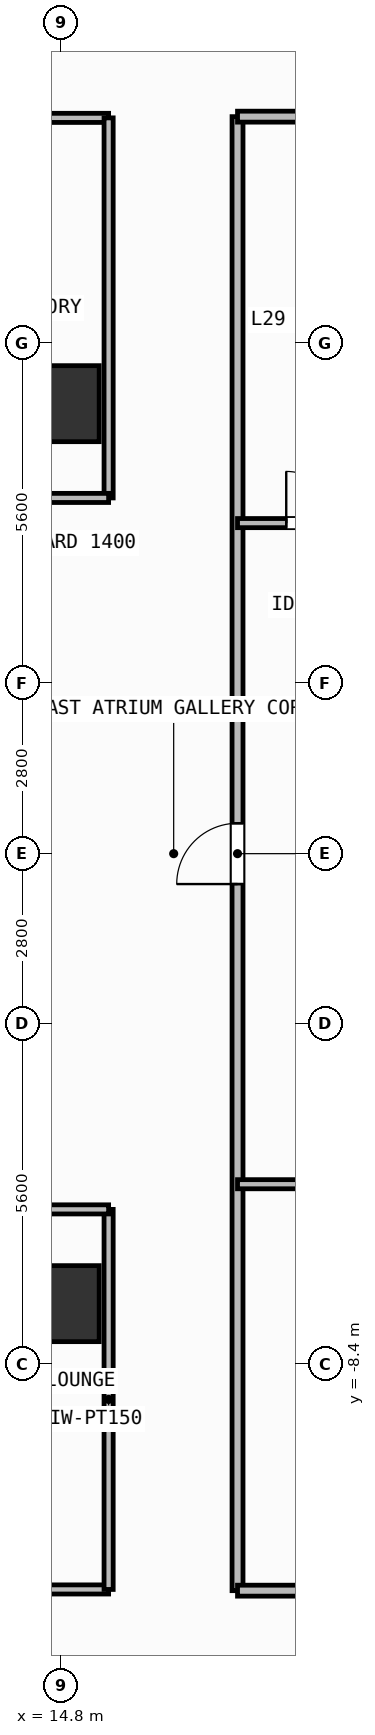
"""IFC4 building model, lengths in metres.
Left out: names, types, materials, properties, quantities, classifications, styles, units other than length and angle.
Written with IfcOpenShell. Run it as: python <this file> out.ifc"""

import sys

from ifc_helpers import new_model, si_unit, direction, frame, frame_2d, origin, origin_2d, place, context, subcontext, project, spatial, rectangle, extrude, element, fill, save


model = new_model("IFC4")
c1 = context("Model", 3, precision=1e-05, world=origin(), true_north=direction((0.0, 1.0)))
c2 = subcontext(c1, "Body", "Model", "MODEL_VIEW")
j1 = project(units=[si_unit("LENGTHUNIT", "METRE"), si_unit("PLANEANGLEUNIT", "RADIAN")], contexts=[c1])
p1 = place(None, origin())
s1 = spatial("IfcSite", under=j1, at=p1, CompositionType="ELEMENT")
p2 = place(p1, origin())
s2 = spatial("IfcBuilding", under=s1, at=p2, CompositionType="ELEMENT")
p3 = place(p2, frame((0.0, 0.0, 117.3)))
s3 = spatial("IfcBuildingStorey", under=s2, at=p3, CompositionType="ELEMENT", Elevation=117.3)
for number, where, z_axis, x_axis in (
    (1, (14.8, -7.4, 0.0), (0.0, 0.0, 1.0), (1.0, 0.0, 0.0)),
    (2, (14.8, 7.4, 0.0), (0.0, 0.0, 1.0), (1.0, 0.0, 0.0)),
):
    element("IfcColumn", number, at=place(p3, frame(where, z_axis=z_axis, x_axis=x_axis)), inside=s3, PredefinedType="COLUMN", context=c2, shape_type="SweptSolid", body=[
        extrude(rectangle(XDim=1.25, YDim=1.25, at=origin_2d()), origin(), (0.0, 0.0, 1.0), 3.9),
    ])
p4 = place(p3, frame((10.1, -12.1, 0.0), z_axis=(0.0, 0.0, 1.0), x_axis=(1.0, 0.0, 0.0)))
e3 = element("IfcWall", 3, at=p4, inside=s3, PredefinedType="PARTITIONING", context=c2, shape_type="SweptSolid", body=[
    extrude(rectangle(XDim=5.48, YDim=0.15, at=frame_2d((2.74, 0.0))), origin(), (0.0, 0.0, 1.0), 3.68),
])
p5 = place(p4, frame((2.29, 0.0, 0.0)))
e4 = element("IfcOpeningElement", 4, at=p5, cuts=e3, PredefinedType="OPENING", context=c2, shape_type="SweptSolid", body=[
    extrude(rectangle(XDim=0.9, YDim=2.1, at=frame_2d((0.45, 1.05))), frame((0.0, 0.085, 0.0), z_axis=(0.0, -1.0, 0.0), x_axis=(1.0, 0.0, 0.0)), (0.0, 0.0, 1.0), 0.17),
])
p6 = place(p3, frame((8.36, 12.1, 0.0), z_axis=(0.0, 0.0, 1.0), x_axis=(1.0, 0.0, 0.0)))
e5 = element("IfcWall", 5, at=p6, inside=s3, PredefinedType="PARTITIONING", context=c2, shape_type="SweptSolid", body=[
    extrude(rectangle(XDim=7.22, YDim=0.15, at=frame_2d((3.61, 0.0))), origin(), (0.0, 0.0, 1.0), 3.68),
])
p7 = place(p6, frame((3.513, 0.0, 0.0)))
e6 = element("IfcOpeningElement", 6, at=p7, cuts=e5, PredefinedType="OPENING", context=c2, shape_type="SweptSolid", body=[
    extrude(rectangle(XDim=0.9, YDim=2.1, at=frame_2d((0.45, 1.05))), frame((0.0, 0.085, 0.0), z_axis=(0.0, -1.0, 0.0), x_axis=(1.0, 0.0, 0.0)), (0.0, 0.0, 1.0), 0.17),
])
p8 = place(p3, frame((17.7, -12.12, 0.0), z_axis=(0.0, 0.0, 1.0), x_axis=(0.0, 1.0, 0.0)))
e7 = element("IfcWall", 7, at=p8, inside=s3, PredefinedType="PARTITIONING", context=c2, shape_type="SweptSolid", body=[
    extrude(rectangle(XDim=24.24, YDim=0.18, at=frame_2d((12.12, 0.0))), origin(), (0.0, 0.0, 1.0), 3.68),
])
p9 = place(p8, frame((11.62, 0.0, 0.0)))
e8 = element("IfcOpeningElement", 8, at=p9, cuts=e7, PredefinedType="OPENING", context=c2, shape_type="SweptSolid", body=[
    extrude(rectangle(XDim=1.0, YDim=2.2, at=frame_2d((0.5, 1.1))), frame((0.0, 0.1, 0.0), z_axis=(0.0, -1.0, 0.0), x_axis=(1.0, 0.0, 0.0)), (0.0, 0.0, 1.0), 0.2),
])
p10 = place(p3, frame((17.7, 5.436, 0.0), z_axis=(0.0, 0.0, 1.0), x_axis=(1.0, 0.0, 0.0)))
e9 = element("IfcWall", 9, at=p10, inside=s3, PredefinedType="PARTITIONING", context=c2, shape_type="SweptSolid", body=[
    extrude(rectangle(XDim=2.292, YDim=0.15, at=frame_2d((1.146, 0.0))), origin(), (0.0, 0.0, 1.0), 3.68),
])
p11 = place(p10, frame((0.801, 0.0, 0.0)))
e10 = element("IfcOpeningElement", 10, at=p11, cuts=e9, PredefinedType="OPENING", context=c2, shape_type="SweptSolid", body=[
    extrude(rectangle(XDim=0.85, YDim=2.1, at=frame_2d((0.425, 1.05))), frame((0.0, 0.085, 0.0), z_axis=(0.0, -1.0, 0.0), x_axis=(1.0, 0.0, 0.0)), (0.0, 0.0, 1.0), 0.17),
])
p12 = place(p3, frame((17.7, -5.436, 0.0), z_axis=(0.0, 0.0, 1.0), x_axis=(1.0, 0.0, 0.0)))
e11 = element("IfcWall", 11, at=p12, inside=s3, PredefinedType="PARTITIONING", context=c2, shape_type="SweptSolid", body=[
    extrude(rectangle(XDim=5.59, YDim=0.15, at=frame_2d((2.795, 0.0))), origin(), (0.0, 0.0, 1.0), 3.68),
])
p13 = place(p12, frame((2.458, 0.0, 0.0)))
e12 = element("IfcOpeningElement", 12, at=p13, cuts=e11, PredefinedType="OPENING", context=c2, shape_type="SweptSolid", body=[
    extrude(rectangle(XDim=0.85, YDim=2.1, at=frame_2d((0.425, 1.05))), frame((0.0, 0.085, 0.0), z_axis=(0.0, -1.0, 0.0), x_axis=(1.0, 0.0, 0.0)), (0.0, 0.0, 1.0), 0.17),
])
p14 = place(p3, frame((15.58, -12.1, 0.0), z_axis=(0.0, 0.0, 1.0), x_axis=(0.0, 1.0, 0.0)))
e13 = element("IfcWall", 13, at=p14, inside=s3, PredefinedType="PARTITIONING", context=c2, shape_type="SweptSolid", body=[
    extrude(rectangle(XDim=6.25, YDim=0.15, at=frame_2d((3.125, 0.0))), origin(), (0.0, 0.0, 1.0), 3.68),
])
p15 = place(p3, frame((8.96, -5.85, 0.0), z_axis=(0.0, 0.0, 1.0), x_axis=(1.0, 0.0, 0.0)))
e14 = element("IfcWall", 14, at=p15, inside=s3, PredefinedType="PARTITIONING", context=c2, shape_type="SweptSolid", body=[
    extrude(rectangle(XDim=6.62, YDim=0.15, at=frame_2d((3.31, 0.0))), origin(), (0.0, 0.0, 1.0), 3.68),
])
p16 = place(p3, frame((15.58, 5.85, 0.0), z_axis=(0.0, 0.0, 1.0), x_axis=(0.0, 1.0, 0.0)))
e15 = element("IfcWall", 15, at=p16, inside=s3, PredefinedType="PARTITIONING", context=c2, shape_type="SweptSolid", body=[
    extrude(rectangle(XDim=6.25, YDim=0.15, at=frame_2d((3.125, 0.0))), origin(), (0.0, 0.0, 1.0), 3.68),
])
p17 = place(p3, frame((8.96, 5.85, 0.0), z_axis=(0.0, 0.0, 1.0), x_axis=(1.0, 0.0, 0.0)))
e16 = element("IfcWall", 16, at=p17, inside=s3, PredefinedType="PARTITIONING", context=c2, shape_type="SweptSolid", body=[
    extrude(rectangle(XDim=6.62, YDim=0.15, at=frame_2d((3.31, 0.0))), origin(), (0.0, 0.0, 1.0), 3.68),
])
for number, where, z_axis, x_axis in (
    (17, (17.7, -12.12, 0.0), (0.0, 0.0, 1.0), (1.0, 0.0, 0.0)),
    (18, (17.7, 12.12, 0.0), (0.0, 0.0, 1.0), (1.0, 0.0, 0.0)),
):
    element("IfcWall", number, at=place(p3, frame(where, z_axis=z_axis, x_axis=x_axis)), inside=s3, PredefinedType="PARTITIONING", context=c2, shape_type="SweptSolid", body=[
        extrude(rectangle(XDim=9.83, YDim=0.18, at=frame_2d((4.915, 0.0))), origin(), (0.0, 0.0, 1.0), 3.68),
    ])
p18 = place(p9, origin())
e19 = element("IfcDoor", 19, at=p18, inside=s3, OperationType="SINGLE_SWING_LEFT", PredefinedType="DOOR", context=c2, shape_type="SweptSolid", body=[
    extrude(rectangle(XDim=1.0, YDim=2.2, at=frame_2d((0.5, 1.1))), frame((0.0, 0.025, 0.0), z_axis=(0.0, -1.0, 0.0), x_axis=(1.0, 0.0, 0.0)), (0.0, 0.0, 1.0), 0.05),
])
fill(e8, e19)
p19 = place(p11, origin())
e20 = element("IfcDoor", 20, at=p19, inside=s3, OperationType="SINGLE_SWING_LEFT", PredefinedType="DOOR", context=c2, shape_type="SweptSolid", body=[
    extrude(rectangle(XDim=0.85, YDim=2.1, at=frame_2d((0.425, 1.05))), frame((0.0, 0.025, 0.0), z_axis=(0.0, -1.0, 0.0), x_axis=(1.0, 0.0, 0.0)), (0.0, 0.0, 1.0), 0.05),
])
fill(e10, e20)
save(model, sys.argv[1])
